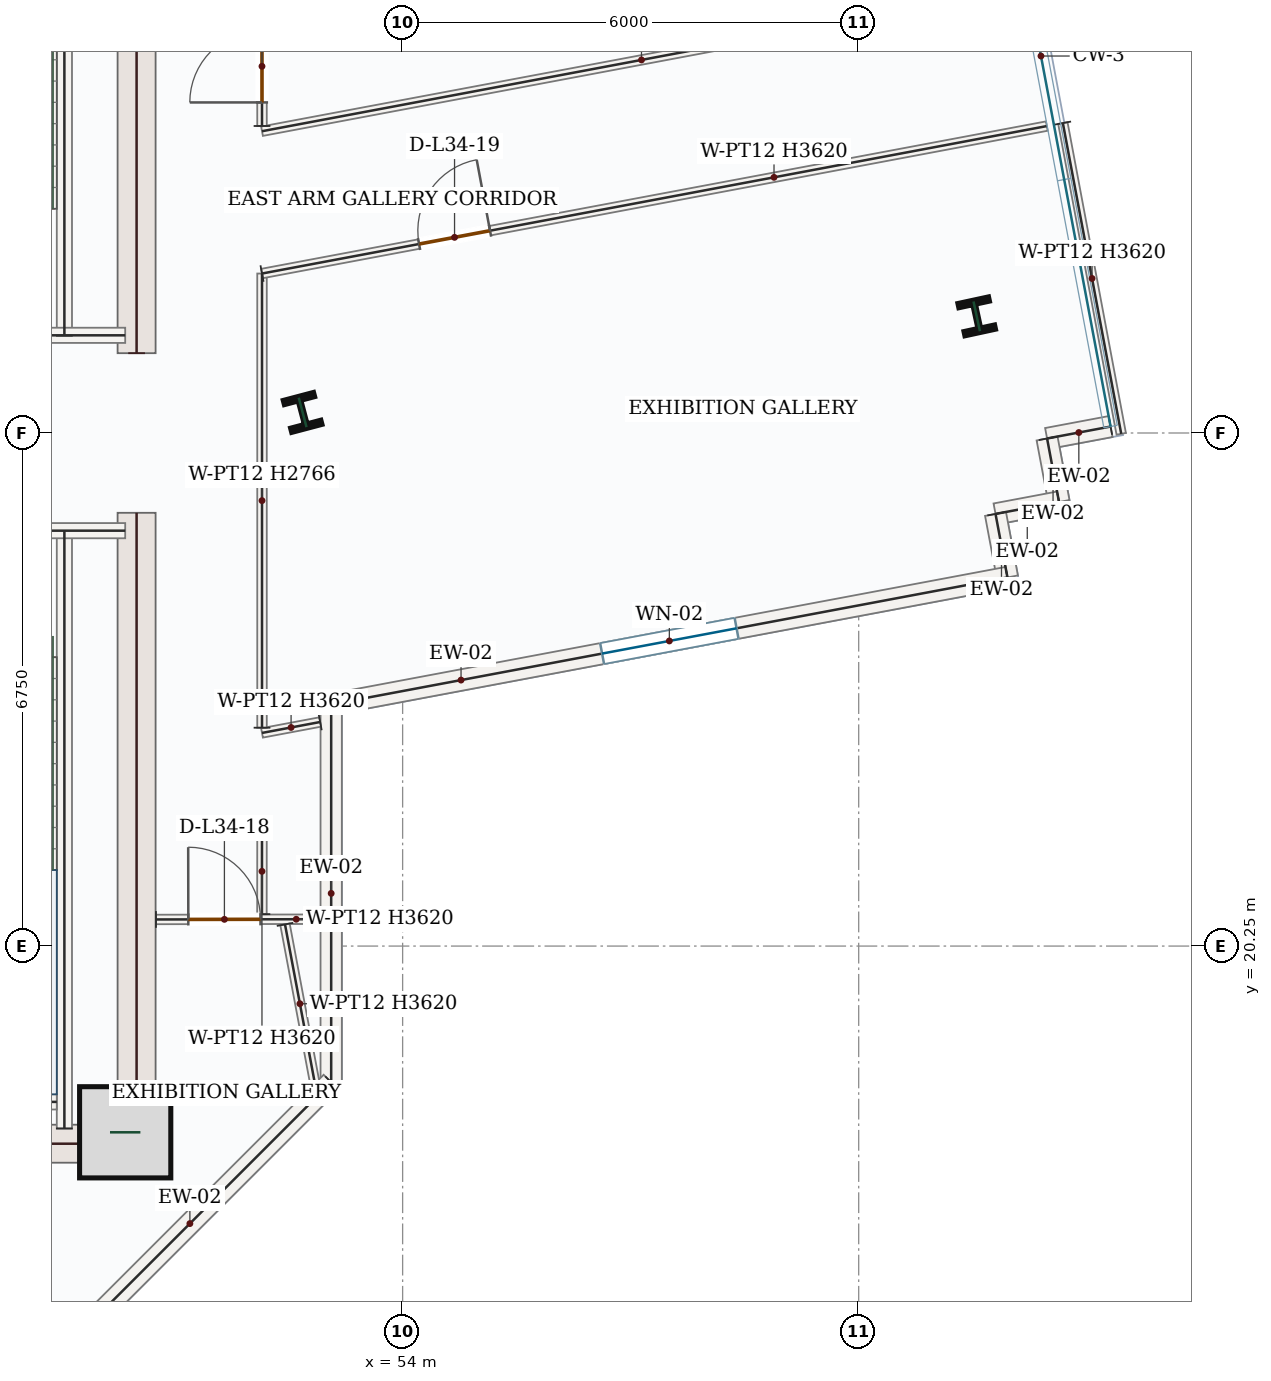
"""IFC4 building model, lengths in metres.
Left out: names, types, materials, properties, quantities, classifications, styles, units other than length and angle.
Written with IfcOpenShell. Run it as: python <this file> out.ifc"""

import sys

from ifc_helpers import new_model, si_unit, direction, frame, frame_2d, origin, origin_2d, place, context, subcontext, project, spatial, rectangle, i_section, extrude, source, transform, mapped, element, fill, save


model = new_model("IFC4")
c1 = context("Model", 3, precision=1e-05, world=origin(), true_north=direction((0.0, 1.0)))
c2 = subcontext(c1, "Body", "Model", "MODEL_VIEW")
j1 = project(units=[si_unit("LENGTHUNIT", "METRE"), si_unit("PLANEANGLEUNIT", "RADIAN")], contexts=[c1])
p1 = place(None, origin())
s1 = spatial("IfcSite", under=j1, at=p1, CompositionType="ELEMENT")
p2 = place(p1, origin())
s2 = spatial("IfcBuilding", under=s1, at=p2, CompositionType="ELEMENT")
p3 = place(p2, frame((0.0, 0.0, 151.2)))
s3 = spatial("IfcBuildingStorey", under=s2, at=p3, CompositionType="ELEMENT", Elevation=151.2)
m1 = source(origin(), c2, "Body", "SweptSolid", [
    extrude(rectangle(XDim=8.55, YDim=0.5, at=frame_2d((4.275, 0.0))), origin(), (0.0, 0.0, 1.0), 3.62),
])
for number, where, z_axis, x_axis in (
    (1, (50.5, 17.4, 0.0), (0.0, 0.0, 1.0), (0.0, 1.0, 0.0)),
    (2, (50.5, 28.05, 0.0), (0.0, 0.0, 1.0), (0.0, 1.0, 0.0)),
):
    element("IfcWall", number, at=place(p3, frame(where, z_axis=z_axis, x_axis=x_axis)), inside=s3, PredefinedType="SHEAR", context=c2, shape_type="MappedRepresentation", body=[
        mapped(m1, transform((0.0, 0.0, 0.0), x_axis=(1.0, 0.0, 0.0), y_axis=(0.0, 1.0, 0.0), z_axis=(0.0, 0.0, 1.0), scale=1.0)),
    ])
m2 = source(origin(), c2, "Body", "SweptSolid", [
    extrude(rectangle(XDim=7.0, YDim=0.5, at=frame_2d((3.5, 0.0))), origin(), (0.0, 0.0, 1.0), 3.62),
])
p4 = place(p3, frame((43.25, 17.65, 0.0), z_axis=(0.0, 0.0, 1.0), x_axis=(1.0, 0.0, 0.0)))
e3 = element("IfcWall", 3, at=p4, inside=s3, PredefinedType="SHEAR", context=c2, shape_type="MappedRepresentation", body=[
    mapped(m2, transform((0.0, 0.0, 0.0), x_axis=(1.0, 0.0, 0.0), y_axis=(0.0, 1.0, 0.0), z_axis=(0.0, 0.0, 1.0), scale=1.0)),
])
m3 = source(origin(), c2, "Body", "SweptSolid", [
    extrude(rectangle(XDim=1.2, YDim=1.2, at=origin_2d()), origin(), (0.0, 0.0, 1.0), 3.9),
])
p5 = place(p3, frame((50.35, 17.8, 0.0), z_axis=(0.0, 0.0, 1.0), x_axis=(1.0, 0.0, 0.0)))
e4 = element("IfcColumn", 4, at=p5, inside=s3, PredefinedType="COLUMN", context=c2, shape_type="MappedRepresentation", body=[
    mapped(m3, transform((0.0, 0.0, 0.0), x_axis=(1.0, 0.0, 0.0), y_axis=(0.0, 1.0, 0.0), z_axis=(0.0, 0.0, 1.0), scale=1.0)),
])
m4 = source(origin(), c2, "Body", "SweptSolid", [
    extrude(i_section(OverallWidth=0.412, OverallDepth=0.435, WebThickness=0.036, FlangeThickness=0.057, FilletRadius=0.018, at=origin_2d()), origin(), (0.0, 0.0, 1.0), 3.9),
])
for number, where, z_axis, x_axis in (
    (5, (52.684, 27.271, 0.0), (0.0, 0.0, 1.0), (0.967, 0.255, 0.0)),
    (6, (61.553, 28.535, 0.0), (0.0, 0.0, 1.0), (0.977, 0.211, 0.0)),
):
    element("IfcColumn", number, at=place(p3, frame(where, z_axis=z_axis, x_axis=x_axis)), inside=s3, PredefinedType="COLUMN", context=c2, shape_type="MappedRepresentation", body=[
        mapped(m4, transform((0.0, 0.0, 0.0), x_axis=(1.0, 0.0, 0.0), y_axis=(0.0, 1.0, 0.0), z_axis=(0.0, 0.0, 1.0), scale=1.0)),
    ])
m5 = source(origin(), c2, "Body", "SweptSolid", [
    extrude(rectangle(XDim=0.85, YDim=0.28, at=frame_2d((0.425, 0.0))), origin(), (0.0, 0.0, 1.0), 3.62),
])
for number, where, z_axis, x_axis in (
    (7, (63.314, 27.085, 0.0), (0.0, 0.0, 1.0), (-0.983, -0.185, 0.0)),
    (8, (62.479, 26.928, 0.0), (0.0, 0.0, 1.0), (0.185, -0.983, 0.0)),
):
    element("IfcWall", number, at=place(p3, frame(where, z_axis=z_axis, x_axis=x_axis)), inside=s3, PredefinedType="SOLIDWALL", context=c2, shape_type="MappedRepresentation", body=[
        mapped(m5, transform((0.0, 0.0, 0.0), x_axis=(1.0, 0.0, 0.0), y_axis=(0.0, 1.0, 0.0), z_axis=(0.0, 0.0, 1.0), scale=1.0)),
    ])
m6 = source(origin(), c2, "Body", "SweptSolid", [
    extrude(rectangle(XDim=0.85, YDim=0.28, at=frame_2d((0.425, 0.0))), origin(), (0.0, 0.0, 1.0), 3.62),
])
p6 = place(p3, frame((62.635, 26.092, 0.0), z_axis=(0.0, 0.0, 1.0), x_axis=(-0.982790785128, -0.184722149909, 0.0)))
e9 = element("IfcWall", 9, at=p6, inside=s3, PredefinedType="SOLIDWALL", context=c2, shape_type="MappedRepresentation", body=[
    mapped(m6, transform((0.0, 0.0, 0.0), x_axis=(1.0, 0.0, 0.0), y_axis=(0.0, 1.0, 0.0), z_axis=(0.0, 0.0, 1.0), scale=1.0)),
])
p7 = place(p3, frame((61.8, 25.935, 0.0), z_axis=(0.0, 0.0, 1.0), x_axis=(0.184392582027, -0.982852672425, 0.0)))
e10 = element("IfcWall", 10, at=p7, inside=s3, PredefinedType="SOLIDWALL", context=c2, shape_type="MappedRepresentation", body=[
    mapped(m5, transform((0.0, 0.0, 0.0), x_axis=(1.0, 0.0, 0.0), y_axis=(0.0, 1.0, 0.0), z_axis=(0.0, 0.0, 1.0), scale=1.0)),
])
p8 = place(p3, frame((61.957, 25.1, 0.0), z_axis=(0.0, 0.0, 1.0), x_axis=(-0.982808012228, -0.184630471755, 0.0)))
e11 = element("IfcWall", 11, at=p8, inside=s3, PredefinedType="SOLIDWALL", context=c2, shape_type="SweptSolid", body=[
    extrude(rectangle(XDim=9.052, YDim=0.28, at=frame_2d((4.526, 0.0))), origin(), (0.0, 0.0, 1.0), 3.62),
])
p9 = place(p8, frame((3.626, 0.0, 0.85)))
e12 = element("IfcOpeningElement", 12, at=p9, cuts=e11, PredefinedType="OPENING", context=c2, shape_type="SweptSolid", body=[
    extrude(rectangle(XDim=1.8, YDim=1.75, at=frame_2d((0.9, 0.875))), frame((0.0, 0.15, 0.0), z_axis=(0.0, -1.0, 0.0), x_axis=(1.0, 0.0, 0.0)), (0.0, 0.0, 1.0), 0.3),
])
m7 = source(origin(), c2, "Body", "SweptSolid", [
    extrude(rectangle(XDim=4.97, YDim=0.28, at=frame_2d((2.485, 0.0))), origin(), (0.0, 0.0, 1.0), 3.62),
])
p10 = place(p3, frame((53.06, 23.428, 0.0), z_axis=(0.0, 0.0, 1.0), x_axis=(0.0, -1.0, 0.0)))
e13 = element("IfcWall", 13, at=p10, inside=s3, PredefinedType="SOLIDWALL", context=c2, shape_type="MappedRepresentation", body=[
    mapped(m7, transform((0.0, 0.0, 0.0), x_axis=(1.0, 0.0, 0.0), y_axis=(0.0, 1.0, 0.0), z_axis=(0.0, 0.0, 1.0), scale=1.0)),
])
m8 = source(origin(), c2, "Body", "SweptSolid", [
    extrude(rectangle(XDim=5.258, YDim=0.28, at=frame_2d((2.629, 0.0))), origin(), (0.0, 0.0, 1.0), 3.62),
])
p11 = place(p3, frame((53.06, 18.458, 0.0), z_axis=(0.0, 0.0, 1.0), x_axis=(-0.707106781187, -0.707106781187, 0.0)))
e14 = element("IfcWall", 14, at=p11, inside=s3, PredefinedType="SOLIDWALL", context=c2, shape_type="MappedRepresentation", body=[
    mapped(m8, transform((0.0, 0.0, 0.0), x_axis=(1.0, 0.0, 0.0), y_axis=(0.0, 1.0, 0.0), z_axis=(0.0, 0.0, 1.0), scale=1.0)),
])
m9 = source(origin(), c2, "Body", "SweptSolid", [
    extrude(rectangle(XDim=7.87, YDim=0.2, at=frame_2d((3.935, 0.0))), origin(), (0.0, 0.0, 1.0), 3.62),
])
for number, where, z_axis, x_axis in (
    (15, (49.55, 17.85, 0.0), (0.0, 0.0, 1.0), (0.0, 1.0, 0.0)),
    (16, (49.55, 28.28, 0.0), (0.0, 0.0, 1.0), (0.0, 1.0, 0.0)),
):
    element("IfcWall", number, at=place(p3, frame(where, z_axis=z_axis, x_axis=x_axis)), inside=s3, PredefinedType="SOLIDWALL", context=c2, shape_type="MappedRepresentation", body=[
        mapped(m9, transform((0.0, 0.0, 0.0), x_axis=(1.0, 0.0, 0.0), y_axis=(0.0, 1.0, 0.0), z_axis=(0.0, 0.0, 1.0), scale=1.0)),
    ])
m10 = source(origin(), c2, "Body", "SweptSolid", [
    extrude(rectangle(XDim=4.25, YDim=0.2, at=frame_2d((2.125, 0.0))), origin(), (0.0, 0.0, 1.0), 3.62),
])
for number, where, z_axis, x_axis in (
    (17, (46.1, 25.715, 0.0), (0.0, 0.0, 1.0), (1.0, 0.0, 0.0)),
    (18, (46.1, 28.285, 0.0), (0.0, 0.0, 1.0), (1.0, 0.0, 0.0)),
):
    element("IfcWall", number, at=place(p3, frame(where, z_axis=z_axis, x_axis=x_axis)), inside=s3, PredefinedType="SOLIDWALL", context=c2, shape_type="MappedRepresentation", body=[
        mapped(m10, transform((0.0, 0.0, 0.0), x_axis=(1.0, 0.0, 0.0), y_axis=(0.0, 1.0, 0.0), z_axis=(0.0, 0.0, 1.0), scale=1.0)),
    ])
m11 = source(origin(), c2, "Body", "SweptSolid", [
    extrude(rectangle(XDim=3.25, YDim=0.2, at=frame_2d((1.625, 0.0))), origin(), (0.0, 0.0, 1.0), 3.62),
])
p12 = place(p3, frame((46.2, 18.2, 0.0), z_axis=(0.0, 0.0, 1.0), x_axis=(1.0, 0.0, 0.0)))
e19 = element("IfcWall", 19, at=p12, inside=s3, PredefinedType="SOLIDWALL", context=c2, shape_type="MappedRepresentation", body=[
    mapped(m11, transform((0.0, 0.0, 0.0), x_axis=(1.0, 0.0, 0.0), y_axis=(0.0, 1.0, 0.0), z_axis=(0.0, 0.0, 1.0), scale=1.0)),
])
p13 = place(p3, frame((50.755, 20.6, 0.0), z_axis=(0.0, 0.0, 1.0), x_axis=(0.99999875384, 0.001578708001, 0.0)))
e20 = element("IfcWall", 20, at=p13, inside=s3, PredefinedType="PARTITIONING", context=c2, shape_type="SweptSolid", body=[
    extrude(rectangle(XDim=2.165, YDim=0.125, at=frame_2d((1.083, 0.0))), origin(), (0.0, 0.0, 1.0), 3.62),
])
p14 = place(p13, frame((0.425, 0.0, 0.0)))
e21 = element("IfcOpeningElement", 21, at=p14, cuts=e20, PredefinedType="OPENING", context=c2, shape_type="SweptSolid", body=[
    extrude(rectangle(XDim=0.95, YDim=2.15, at=frame_2d((0.475, 1.075))), frame((0.0, 0.073, 0.0), z_axis=(0.0, -1.0, 0.0), x_axis=(1.0, 0.0, 0.0)), (0.0, 0.0, 1.0), 0.145),
])
m12 = source(origin(), c2, "Body", "SweptSolid", [
    extrude(rectangle(XDim=1.127, YDim=0.125, at=frame_2d((0.563, 0.0))), origin(), (0.0, 0.0, 1.0), 3.62),
])
p15 = place(p3, frame((52.149, 20.67, 0.0), z_axis=(0.0, 0.0, 1.0), x_axis=(0.001083188273, 0.999999413351, 0.0)))
e22 = element("IfcWall", 22, at=p15, inside=s3, PredefinedType="PARTITIONING", context=c2, shape_type="MappedRepresentation", body=[
    mapped(m12, transform((0.0, 0.0, 0.0), x_axis=(1.0, 0.0, 0.0), y_axis=(0.0, 1.0, 0.0), z_axis=(0.0, 0.0, 1.0), scale=1.0)),
])
m13 = source(origin(), c2, "Body", "SweptSolid", [
    extrude(rectangle(XDim=2.124, YDim=0.125, at=frame_2d((1.062, 0.0))), origin(), (0.0, 0.0, 1.0), 3.62),
])
p16 = place(p3, frame((52.452, 20.535, 0.0), z_axis=(0.0, 0.0, 1.0), x_axis=(0.184697942122, -0.982795334836, 0.0)))
e23 = element("IfcWall", 23, at=p16, inside=s3, PredefinedType="PARTITIONING", context=c2, shape_type="MappedRepresentation", body=[
    mapped(m13, transform((0.0, 0.0, 0.0), x_axis=(1.0, 0.0, 0.0), y_axis=(0.0, 1.0, 0.0), z_axis=(0.0, 0.0, 1.0), scale=1.0)),
])
m14 = source(origin(), c2, "Body", "SweptSolid", [
    extrude(rectangle(XDim=4.16, YDim=0.125, at=frame_2d((2.08, 0.0))), origin(), (0.0, 0.0, 1.0), 3.62),
])
p17 = place(p3, frame((62.686, 31.077, 0.0), z_axis=(0.0, 0.0, 1.0), x_axis=(0.184635785614, -0.982807013951, 0.0)))
e24 = element("IfcWall", 24, at=p17, inside=s3, PredefinedType="PARTITIONING", context=c2, shape_type="MappedRepresentation", body=[
    mapped(m14, transform((0.0, 0.0, 0.0), x_axis=(1.0, 0.0, 0.0), y_axis=(0.0, 1.0, 0.0), z_axis=(0.0, 0.0, 1.0), scale=1.0)),
])
m15 = source(origin(), c2, "Body", "SweptSolid", [
    extrude(rectangle(XDim=0.779, YDim=0.125, at=frame_2d((0.389, 0.0))), origin(), (0.0, 0.0, 1.0), 3.62),
])
p18 = place(p3, frame((52.915, 23.198, 0.0), z_axis=(0.0, 0.0, 1.0), x_axis=(-0.982850878619, -0.184402143149, 0.0)))
e25 = element("IfcWall", 25, at=p18, inside=s3, PredefinedType="PARTITIONING", context=c2, shape_type="MappedRepresentation", body=[
    mapped(m15, transform((0.0, 0.0, 0.0), x_axis=(1.0, 0.0, 0.0), y_axis=(0.0, 1.0, 0.0), z_axis=(0.0, 0.0, 1.0), scale=1.0)),
])
m16 = source(origin(), c2, "Body", "SweptSolid", [
    extrude(rectangle(XDim=5.975, YDim=0.125, at=frame_2d((2.988, 0.0))), origin(), (0.0, 0.0, 1.0), 2.766),
])
p19 = place(p3, frame((52.15, 23.123, 0.0), z_axis=(0.0, 0.0, 1.0), x_axis=(0.0, 1.0, 0.0)))
e26 = element("IfcWall", 26, at=p19, inside=s3, PredefinedType="PARTITIONING", context=c2, shape_type="MappedRepresentation", body=[
    mapped(m16, transform((0.0, 0.0, 0.0), x_axis=(1.0, 0.0, 0.0), y_axis=(0.0, 1.0, 0.0), z_axis=(0.0, 0.0, 1.0), scale=1.0)),
])
p20 = place(p3, frame((52.15, 29.098, 0.0), z_axis=(0.0, 0.0, 1.0), x_axis=(0.982805559331, 0.184643528314, 0.0)))
e27 = element("IfcWall", 27, at=p20, inside=s3, PredefinedType="PARTITIONING", context=c2, shape_type="SweptSolid", body=[
    extrude(rectangle(XDim=10.505, YDim=0.125, at=frame_2d((5.252, 0.0))), origin(), (0.0, 0.0, 1.0), 3.62),
])
p21 = place(p20, frame((2.102, 0.0, 0.0)))
e28 = element("IfcOpeningElement", 28, at=p21, cuts=e27, PredefinedType="OPENING", context=c2, shape_type="SweptSolid", body=[
    extrude(rectangle(XDim=0.95, YDim=2.15, at=frame_2d((0.475, 1.075))), frame((0.0, 0.073, 0.0), z_axis=(0.0, -1.0, 0.0), x_axis=(1.0, 0.0, 0.0)), (0.0, 0.0, 1.0), 0.145),
])
m17 = source(origin(), c2, "Body", "SweptSolid", [
    extrude(rectangle(XDim=10.16, YDim=0.125, at=frame_2d((5.08, 0.0))), origin(), (0.0, 0.0, 1.0), 3.62),
])
p22 = place(p3, frame((62.135, 32.846, 0.0), z_axis=(0.0, 0.0, 1.0), x_axis=(-0.982809288671, -0.184623676981, 0.0)))
e29 = element("IfcWall", 29, at=p22, inside=s3, PredefinedType="PARTITIONING", context=c2, shape_type="MappedRepresentation", body=[
    mapped(m17, transform((0.0, 0.0, 0.0), x_axis=(1.0, 0.0, 0.0), y_axis=(0.0, 1.0, 0.0), z_axis=(0.0, 0.0, 1.0), scale=1.0)),
])
p23 = place(p3, frame((52.15, 31.039, 0.0), z_axis=(0.0, 0.0, 1.0), x_axis=(-0.0004137788, 0.999999914394, 0.0)))
e30 = element("IfcWall", 30, at=p23, inside=s3, PredefinedType="PARTITIONING", context=c2, shape_type="SweptSolid", body=[
    extrude(rectangle(XDim=2.36, YDim=0.125, at=frame_2d((1.18, 0.0))), origin(), (0.0, 0.0, 1.0), 3.149),
])
p24 = place(p23, frame((0.31, 0.0, 0.0)))
e31 = element("IfcOpeningElement", 31, at=p24, cuts=e30, PredefinedType="OPENING", context=c2, shape_type="SweptSolid", body=[
    extrude(rectangle(XDim=0.95, YDim=2.15, at=frame_2d((0.475, 1.075))), frame((0.0, 0.073, 0.0), z_axis=(0.0, -1.0, 0.0), x_axis=(1.0, 0.0, 0.0)), (0.0, 0.0, 1.0), 0.145),
])
m18 = source(origin(), c2, "Body", "SweptSolid", [
    extrude(rectangle(XDim=1.8, YDim=1.75, at=frame_2d((0.9, 0.875))), frame((0.0, 0.03, 0.0), z_axis=(0.0, -1.0, 0.0), x_axis=(1.0, 0.0, 0.0)), (0.0, 0.0, 1.0), 0.06),
])
p25 = place(p9, origin())
e32 = element("IfcWindow", 32, at=p25, inside=s3, PartitioningType="DOUBLE_PANEL_VERTICAL", PredefinedType="WINDOW", context=c2, shape_type="MappedRepresentation", body=[
    mapped(m18, transform((0.0, 0.0, 0.0), x_axis=(1.0, 0.0, 0.0), y_axis=(0.0, 1.0, 0.0), z_axis=(0.0, 0.0, 1.0), scale=1.0)),
])
fill(e12, e32)
m19 = source(origin(), c2, "Body", "SweptSolid", [
    extrude(rectangle(XDim=0.95, YDim=2.15, at=frame_2d((0.475, 1.075))), frame((0.0, 0.025, 0.0), z_axis=(0.0, -1.0, 0.0), x_axis=(1.0, 0.0, 0.0)), (0.0, 0.0, 1.0), 0.05),
])
p26 = place(p14, origin())
e33 = element("IfcDoor", 33, at=p26, inside=s3, OperationType="SINGLE_SWING_LEFT", PredefinedType="DOOR", context=c2, shape_type="MappedRepresentation", body=[
    mapped(m19, transform((0.0, 0.0, 0.0), x_axis=(1.0, 0.0, 0.0), y_axis=(0.0, 1.0, 0.0), z_axis=(0.0, 0.0, 1.0), scale=1.0)),
])
fill(e21, e33)
p27 = place(p21, origin())
e34 = element("IfcDoor", 34, at=p27, inside=s3, OperationType="SINGLE_SWING_RIGHT", PredefinedType="DOOR", context=c2, shape_type="MappedRepresentation", body=[
    mapped(m19, transform((0.0, 0.0, 0.0), x_axis=(1.0, 0.0, 0.0), y_axis=(0.0, 1.0, 0.0), z_axis=(0.0, 0.0, 1.0), scale=1.0)),
])
fill(e28, e34)
p28 = place(p24, origin())
e35 = element("IfcDoor", 35, at=p28, inside=s3, OperationType="SINGLE_SWING_LEFT", PredefinedType="DOOR", context=c2, shape_type="MappedRepresentation", body=[
    mapped(m19, transform((0.0, 0.0, 0.0), x_axis=(1.0, 0.0, 0.0), y_axis=(0.0, 1.0, 0.0), z_axis=(0.0, 0.0, 1.0), scale=1.0)),
])
fill(e31, e35)
save(model, sys.argv[1])
